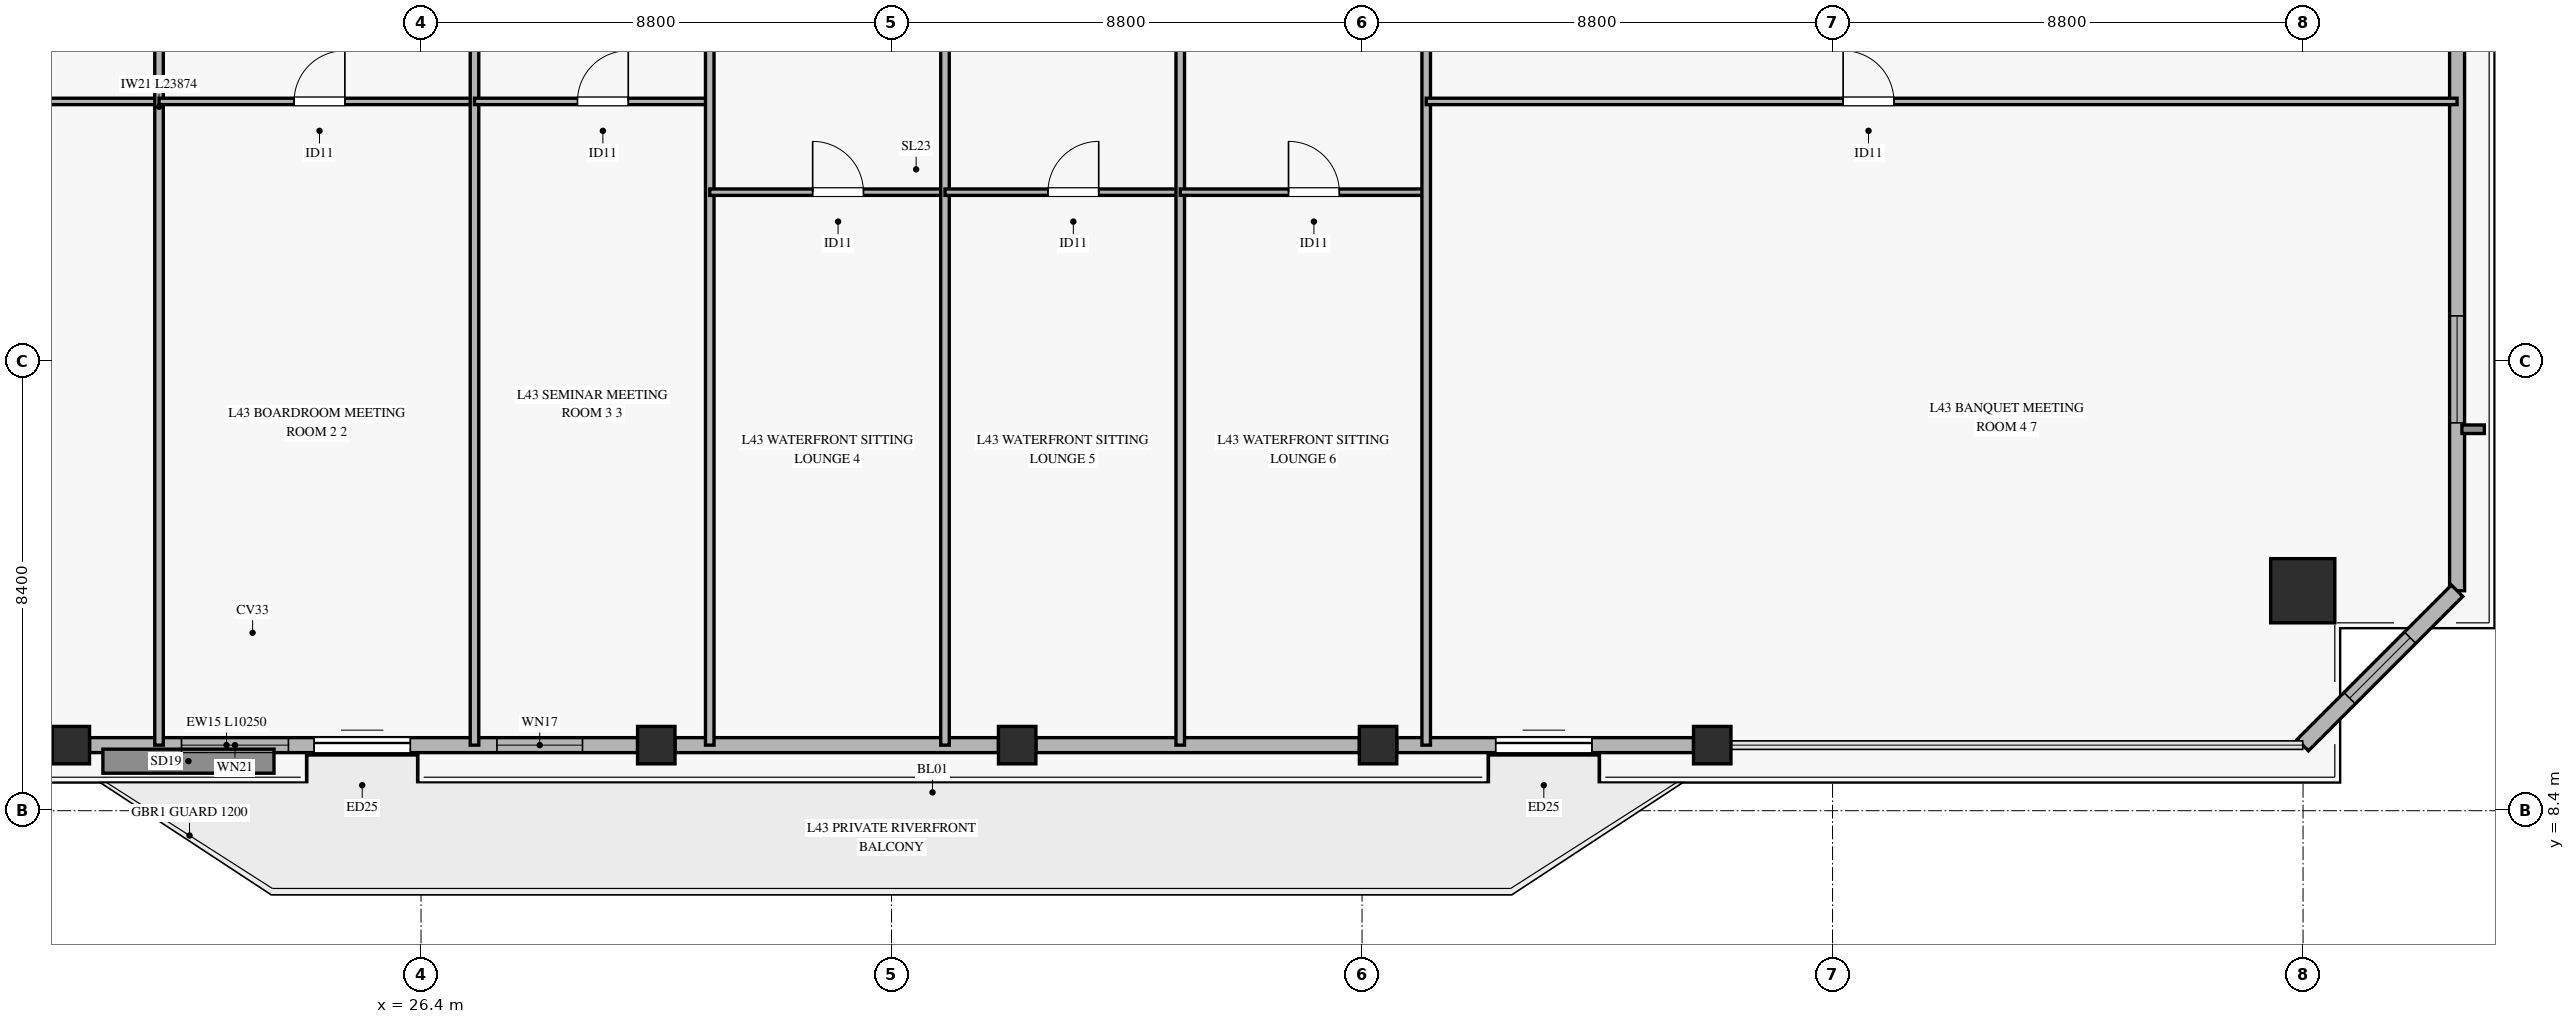
"""IFC4 building model, lengths in metres.
Left out: names, types, materials, properties, quantities, classifications, styles, units other than length and angle.
Written with IfcOpenShell. Run it as: python <this file> out.ifc"""

import sys

from ifc_helpers import new_model, si_unit, direction, frame, frame_2d, origin, origin_2d, place, context, subcontext, project, spatial, rectangle, hollow_rectangle, extrude, source, transform, mapped, element, fill, save


model = new_model("IFC4")
c1 = context("Model", 3, precision=1e-05, world=origin(), true_north=direction((0.0, 1.0)))
c2 = subcontext(c1, "Body", "Model", "MODEL_VIEW")
j1 = project(units=[si_unit("LENGTHUNIT", "METRE"), si_unit("PLANEANGLEUNIT", "RADIAN")], contexts=[c1])
p1 = place(None, origin())
s1 = spatial("IfcSite", under=j1, at=p1, CompositionType="ELEMENT")
p2 = place(p1, origin())
s2 = spatial("IfcBuilding", under=s1, at=p2, CompositionType="ELEMENT")
p3 = place(p2, frame((0.0, 0.0, 173.7)))
s3 = spatial("IfcBuildingStorey", under=s2, at=p3, CompositionType="ELEMENT", Elevation=173.7)
m1 = source(origin(), c2, "Body", "SweptSolid", [
    extrude(hollow_rectangle(XDim=1.2, YDim=1.2, WallThickness=0.055, at=origin_2d()), origin(), (0.0, 0.0, 1.0), 3.27),
])
p4 = place(p3, frame((61.594, 12.513, 0.0), z_axis=(0.0, 0.0, 1.0), x_axis=(1.0, 0.0, 0.0)))
e1 = element("IfcColumn", 1, at=p4, inside=s3, PredefinedType="COLUMN", context=c2, shape_type="MappedRepresentation", body=[
    mapped(m1, transform((0.0, 0.0, 0.0), x_axis=(1.0, 0.0, 0.0), y_axis=(0.0, 1.0, 0.0), z_axis=(0.0, 0.0, 1.0), scale=1.0)),
])
m2 = source(origin(), c2, "Body", "SweptSolid", [
    extrude(hollow_rectangle(XDim=0.7, YDim=0.7, WallThickness=0.032, at=origin_2d()), origin(), (0.0, 0.0, 1.0), 3.27),
])
for number, where, z_axis, x_axis in (
    (2, (19.85, 9.626, 0.0), (0.0, 0.0, 1.0), (1.0, 0.0, 0.0)),
    (3, (30.8, 9.626, 0.0), (0.0, 0.0, 1.0), (1.0, 0.0, 0.0)),
    (4, (37.55, 9.626, 0.0), (0.0, 0.0, 1.0), (1.0, 0.0, 0.0)),
    (5, (44.3, 9.626, 0.0), (0.0, 0.0, 1.0), (1.0, 0.0, 0.0)),
    (6, (50.55, 9.626, 0.0), (0.0, 0.0, 1.0), (1.0, 0.0, 0.0)),
):
    element("IfcColumn", number, at=place(p3, frame(where, z_axis=z_axis, x_axis=x_axis)), inside=s3, PredefinedType="COLUMN", context=c2, shape_type="MappedRepresentation", body=[
        mapped(m2, transform((0.0, 0.0, 0.0), x_axis=(1.0, 0.0, 0.0), y_axis=(0.0, 1.0, 0.0), z_axis=(0.0, 0.0, 1.0), scale=1.0)),
    ])
p5 = place(p3, frame((20.2, 9.626, 0.0), z_axis=(0.0, 0.0, 1.0), x_axis=(1.0, 0.0, 0.0)))
e7 = element("IfcWall", 7, at=p5, inside=s3, PredefinedType="SOLIDWALL", context=c2, shape_type="SweptSolid", body=[
    extrude(rectangle(XDim=10.25, YDim=0.28, at=frame_2d((5.125, 0.0))), origin(), (0.0, 0.0, 1.0), 2.75),
])
p6 = place(p5, frame((4.2, 0.0, 0.0)))
e8 = element("IfcOpeningElement", 8, at=p6, cuts=e7, PredefinedType="OPENING", context=c2, shape_type="SweptSolid", body=[
    extrude(rectangle(XDim=1.8, YDim=2.25, at=frame_2d((0.9, 1.125))), frame((0.0, 0.15, 0.0), z_axis=(0.0, -1.0, 0.0), x_axis=(1.0, 0.0, 0.0)), (0.0, 0.0, 1.0), 0.3),
])
p7 = place(p5, frame((1.72, 0.0, 0.45)))
e9 = element("IfcOpeningElement", 9, at=p7, cuts=e7, PredefinedType="OPENING", context=c2, shape_type="SweptSolid", body=[
    extrude(rectangle(XDim=2.0, YDim=2.0, at=frame_2d((1.0, 1.0))), frame((0.0, 0.15, 0.0), z_axis=(0.0, -1.0, 0.0), x_axis=(1.0, 0.0, 0.0)), (0.0, 0.0, 1.0), 0.3),
])
p8 = place(p5, frame((7.62, 0.0, 0.45)))
e10 = element("IfcOpeningElement", 10, at=p8, cuts=e7, PredefinedType="OPENING", context=c2, shape_type="SweptSolid", body=[
    extrude(rectangle(XDim=1.6, YDim=2.0, at=frame_2d((0.8, 1.0))), frame((0.0, 0.15, 0.0), z_axis=(0.0, -1.0, 0.0), x_axis=(1.0, 0.0, 0.0)), (0.0, 0.0, 1.0), 0.3),
])
for number, where, z_axis, x_axis in (
    (11, (31.15, 9.626, 0.0), (0.0, 0.0, 1.0), (1.0, 0.0, 0.0)),
    (12, (37.9, 9.626, 0.0), (0.0, 0.0, 1.0), (1.0, 0.0, 0.0)),
):
    element("IfcWall", number, at=place(p3, frame(where, z_axis=z_axis, x_axis=x_axis)), inside=s3, PredefinedType="SOLIDWALL", context=c2, shape_type="SweptSolid", body=[
        extrude(rectangle(XDim=6.05, YDim=0.28, at=frame_2d((3.025, 0.0))), origin(), (0.0, 0.0, 1.0), 2.75),
    ])
p9 = place(p3, frame((44.65, 9.626, 0.0), z_axis=(0.0, 0.0, 1.0), x_axis=(1.0, 0.0, 0.0)))
e13 = element("IfcWall", 13, at=p9, inside=s3, PredefinedType="SOLIDWALL", context=c2, shape_type="SweptSolid", body=[
    extrude(rectangle(XDim=5.55, YDim=0.28, at=frame_2d((2.775, 0.0))), origin(), (0.0, 0.0, 1.0), 2.75),
])
p10 = place(p9, frame((1.85, 0.0, 0.0)))
e14 = element("IfcOpeningElement", 14, at=p10, cuts=e13, PredefinedType="OPENING", context=c2, shape_type="SweptSolid", body=[
    extrude(rectangle(XDim=1.8, YDim=2.25, at=frame_2d((0.9, 1.125))), frame((0.0, 0.15, 0.0), z_axis=(0.0, -1.0, 0.0), x_axis=(1.0, 0.0, 0.0)), (0.0, 0.0, 1.0), 0.3),
])
p11 = place(p3, frame((64.481, 12.513, 0.0), z_axis=(0.0, 0.0, 1.0), x_axis=(0.0, 1.0, 0.0)))
e15 = element("IfcWall", 15, at=p11, inside=s3, PredefinedType="SOLIDWALL", context=c2, shape_type="SweptSolid", body=[
    extrude(rectangle(XDim=15.0, YDim=0.28, at=frame_2d((7.5, 0.0))), origin(), (0.0, 0.0, 1.0), 2.75),
])
p12 = place(p11, frame((3.14, 0.0, 0.45)))
e16 = element("IfcOpeningElement", 16, at=p12, cuts=e15, PredefinedType="OPENING", context=c2, shape_type="SweptSolid", body=[
    extrude(rectangle(XDim=2.0, YDim=2.0, at=frame_2d((1.0, 1.0))), frame((0.0, 0.15, 0.0), z_axis=(0.0, -1.0, 0.0), x_axis=(1.0, 0.0, 0.0)), (0.0, 0.0, 1.0), 0.3),
])
p13 = place(p11, frame((10.14, 0.0, 0.45)))
e17 = element("IfcOpeningElement", 17, at=p13, cuts=e15, PredefinedType="OPENING", context=c2, shape_type="SweptSolid", body=[
    extrude(rectangle(XDim=2.0, YDim=2.0, at=frame_2d((1.0, 1.0))), frame((0.0, 0.15, 0.0), z_axis=(0.0, -1.0, 0.0), x_axis=(1.0, 0.0, 0.0)), (0.0, 0.0, 1.0), 0.3),
])
p14 = place(p3, frame((61.594, 9.626, 0.0), z_axis=(0.0, 0.0, 1.0), x_axis=(0.707106781187, 0.707106781187, 0.0)))
e18 = element("IfcWall", 18, at=p14, inside=s3, PredefinedType="SOLIDWALL", context=c2, shape_type="SweptSolid", body=[
    extrude(rectangle(XDim=4.083, YDim=0.3, at=frame_2d((2.042, 0.0))), origin(), (0.0, 0.0, 1.0), 2.75),
])
p15 = place(p14, frame((1.241, 0.0, 0.45)))
e19 = element("IfcOpeningElement", 19, at=p15, cuts=e18, PredefinedType="OPENING", context=c2, shape_type="SweptSolid", body=[
    extrude(rectangle(XDim=1.6, YDim=2.0, at=frame_2d((0.8, 1.0))), frame((0.0, 0.16, 0.0), z_axis=(0.0, -1.0, 0.0), x_axis=(1.0, 0.0, 0.0)), (0.0, 0.0, 1.0), 0.32),
])
p16 = place(p3, frame((5.919, 21.663, 0.0), z_axis=(0.0, 0.0, 1.0), x_axis=(1.0, 0.0, 0.0)))
e20 = element("IfcWall", 20, at=p16, inside=s3, PredefinedType="PARTITIONING", context=c2, shape_type="SweptSolid", body=[
    extrude(rectangle(XDim=15.581, YDim=0.12, at=frame_2d((7.791, 0.0))), origin(), (0.0, 0.0, 1.0), 2.455),
])
p17 = place(p16, frame((6.518, 0.0, 0.0)))
e21 = element("IfcOpeningElement", 21, at=p17, cuts=e20, PredefinedType="OPENING", context=c2, shape_type="SweptSolid", body=[
    extrude(rectangle(XDim=0.95, YDim=2.1, at=frame_2d((0.475, 1.05))), frame((0.0, 0.07, 0.0), z_axis=(0.0, -1.0, 0.0), x_axis=(1.0, 0.0, 0.0)), (0.0, 0.0, 1.0), 0.14),
])
p18 = place(p3, frame((21.5, 9.626, 0.0), z_axis=(0.0, 0.0, 1.0), x_axis=(0.0, 1.0, 0.0)))
e22 = element("IfcWall", 22, at=p18, inside=s3, PredefinedType="PARTITIONING", context=c2, shape_type="SweptSolid", body=[
    extrude(rectangle(XDim=23.874, YDim=0.16, at=frame_2d((11.937, 0.0))), origin(), (0.0, 0.0, 1.0), 2.755),
])
p19 = place(p3, frame((21.5, 21.663, 0.0), z_axis=(0.0, 0.0, 1.0), x_axis=(1.0, 0.0, 0.0)))
e23 = element("IfcWall", 23, at=p19, inside=s3, PredefinedType="PARTITIONING", context=c2, shape_type="SweptSolid", body=[
    extrude(rectangle(XDim=5.9, YDim=0.12, at=frame_2d((2.95, 0.0))), origin(), (0.0, 0.0, 1.0), 3.27),
])
p20 = place(p19, frame((2.526, 0.0, 0.0)))
e24 = element("IfcOpeningElement", 24, at=p20, cuts=e23, PredefinedType="OPENING", context=c2, shape_type="SweptSolid", body=[
    extrude(rectangle(XDim=0.95, YDim=2.1, at=frame_2d((0.475, 1.05))), frame((0.0, 0.07, 0.0), z_axis=(0.0, -1.0, 0.0), x_axis=(1.0, 0.0, 0.0)), (0.0, 0.0, 1.0), 0.14),
])
p21 = place(p3, frame((27.4, 9.626, 0.0), z_axis=(0.0, 0.0, 1.0), x_axis=(0.0, 1.0, 0.0)))
e25 = element("IfcWall", 25, at=p21, inside=s3, PredefinedType="PARTITIONING", context=c2, shape_type="SweptSolid", body=[
    extrude(rectangle(XDim=23.874, YDim=0.16, at=frame_2d((11.937, 0.0))), origin(), (0.0, 0.0, 1.0), 2.755),
])
p22 = place(p3, frame((27.4, 21.663, 0.0), z_axis=(0.0, 0.0, 1.0), x_axis=(1.0, 0.0, 0.0)))
e26 = element("IfcWall", 26, at=p22, inside=s3, PredefinedType="PARTITIONING", context=c2, shape_type="SweptSolid", body=[
    extrude(rectangle(XDim=4.4, YDim=0.12, at=frame_2d((2.2, 0.0))), origin(), (0.0, 0.0, 1.0), 2.455),
])
p23 = place(p22, frame((1.926, 0.0, 0.0)))
e27 = element("IfcOpeningElement", 27, at=p23, cuts=e26, PredefinedType="OPENING", context=c2, shape_type="SweptSolid", body=[
    extrude(rectangle(XDim=0.95, YDim=2.1, at=frame_2d((0.475, 1.05))), frame((0.0, 0.07, 0.0), z_axis=(0.0, -1.0, 0.0), x_axis=(1.0, 0.0, 0.0)), (0.0, 0.0, 1.0), 0.14),
])
p24 = place(p3, frame((31.8, 9.626, 0.0), z_axis=(0.0, 0.0, 1.0), x_axis=(0.0, 1.0, 0.0)))
e28 = element("IfcWall", 28, at=p24, inside=s3, PredefinedType="PARTITIONING", context=c2, shape_type="SweptSolid", body=[
    extrude(rectangle(XDim=23.874, YDim=0.16, at=frame_2d((11.937, 0.0))), origin(), (0.0, 0.0, 1.0), 2.755),
])
p25 = place(p3, frame((31.8, 19.966, 0.0), z_axis=(0.0, 0.0, 1.0), x_axis=(1.0, 0.0, 0.0)))
e29 = element("IfcWall", 29, at=p25, inside=s3, PredefinedType="PARTITIONING", context=c2, shape_type="SweptSolid", body=[
    extrude(rectangle(XDim=4.4, YDim=0.12, at=frame_2d((2.2, 0.0))), origin(), (0.0, 0.0, 1.0), 3.27),
])
p26 = place(p25, frame((1.925, 0.0, 0.0)))
e30 = element("IfcOpeningElement", 30, at=p26, cuts=e29, PredefinedType="OPENING", context=c2, shape_type="SweptSolid", body=[
    extrude(rectangle(XDim=0.95, YDim=2.1, at=frame_2d((0.475, 1.05))), frame((0.0, 0.07, 0.0), z_axis=(0.0, -1.0, 0.0), x_axis=(1.0, 0.0, 0.0)), (0.0, 0.0, 1.0), 0.14),
])
p27 = place(p3, frame((36.2, 9.626, 0.0), z_axis=(0.0, 0.0, 1.0), x_axis=(0.0, 1.0, 0.0)))
e31 = element("IfcWall", 31, at=p27, inside=s3, PredefinedType="PARTITIONING", context=c2, shape_type="SweptSolid", body=[
    extrude(rectangle(XDim=23.874, YDim=0.16, at=frame_2d((11.937, 0.0))), origin(), (0.0, 0.0, 1.0), 2.755),
])
p28 = place(p3, frame((36.2, 19.966, 0.0), z_axis=(0.0, 0.0, 1.0), x_axis=(1.0, 0.0, 0.0)))
e32 = element("IfcWall", 32, at=p28, inside=s3, PredefinedType="PARTITIONING", context=c2, shape_type="SweptSolid", body=[
    extrude(rectangle(XDim=4.4, YDim=0.12, at=frame_2d((2.2, 0.0))), origin(), (0.0, 0.0, 1.0), 2.455),
])
p29 = place(p28, frame((1.925, 0.0, 0.0)))
e33 = element("IfcOpeningElement", 33, at=p29, cuts=e32, PredefinedType="OPENING", context=c2, shape_type="SweptSolid", body=[
    extrude(rectangle(XDim=0.95, YDim=2.1, at=frame_2d((0.475, 1.05))), frame((0.0, 0.07, 0.0), z_axis=(0.0, -1.0, 0.0), x_axis=(1.0, 0.0, 0.0)), (0.0, 0.0, 1.0), 0.14),
])
p30 = place(p3, frame((40.6, 9.626, 0.0), z_axis=(0.0, 0.0, 1.0), x_axis=(0.0, 1.0, 0.0)))
e34 = element("IfcWall", 34, at=p30, inside=s3, PredefinedType="PARTITIONING", context=c2, shape_type="SweptSolid", body=[
    extrude(rectangle(XDim=23.874, YDim=0.16, at=frame_2d((11.937, 0.0))), origin(), (0.0, 0.0, 1.0), 2.755),
])
p31 = place(p3, frame((40.6, 19.966, 0.0), z_axis=(0.0, 0.0, 1.0), x_axis=(1.0, 0.0, 0.0)))
e35 = element("IfcWall", 35, at=p31, inside=s3, PredefinedType="PARTITIONING", context=c2, shape_type="SweptSolid", body=[
    extrude(rectangle(XDim=4.6, YDim=0.12, at=frame_2d((2.3, 0.0))), origin(), (0.0, 0.0, 1.0), 2.455),
])
p32 = place(p31, frame((2.025, 0.0, 0.0)))
e36 = element("IfcOpeningElement", 36, at=p32, cuts=e35, PredefinedType="OPENING", context=c2, shape_type="SweptSolid", body=[
    extrude(rectangle(XDim=0.95, YDim=2.1, at=frame_2d((0.475, 1.05))), frame((0.0, 0.07, 0.0), z_axis=(0.0, -1.0, 0.0), x_axis=(1.0, 0.0, 0.0)), (0.0, 0.0, 1.0), 0.14),
])
p33 = place(p3, frame((45.2, 9.626, 0.0), z_axis=(0.0, 0.0, 1.0), x_axis=(0.0, 1.0, 0.0)))
e37 = element("IfcWall", 37, at=p33, inside=s3, PredefinedType="PARTITIONING", context=c2, shape_type="SweptSolid", body=[
    extrude(rectangle(XDim=23.874, YDim=0.16, at=frame_2d((11.937, 0.0))), origin(), (0.0, 0.0, 1.0), 2.755),
])
p34 = place(p3, frame((45.2, 21.663, 0.0), z_axis=(0.0, 0.0, 1.0), x_axis=(1.0, 0.0, 0.0)))
e38 = element("IfcWall", 38, at=p34, inside=s3, PredefinedType="PARTITIONING", context=c2, shape_type="SweptSolid", body=[
    extrude(rectangle(XDim=19.281, YDim=0.12, at=frame_2d((9.641, 0.0))), origin(), (0.0, 0.0, 1.0), 2.455),
])
p35 = place(p34, frame((7.798, 0.0, 0.0)))
e39 = element("IfcOpeningElement", 39, at=p35, cuts=e38, PredefinedType="OPENING", context=c2, shape_type="SweptSolid", body=[
    extrude(rectangle(XDim=0.95, YDim=2.1, at=frame_2d((0.475, 1.05))), frame((0.0, 0.07, 0.0), z_axis=(0.0, -1.0, 0.0), x_axis=(1.0, 0.0, 0.0)), (0.0, 0.0, 1.0), 0.14),
])
m3 = source(origin(), c2, "Body", "SweptSolid", [
    extrude(rectangle(XDim=1.8, YDim=2.25, at=frame_2d((0.9, 1.125))), frame((0.0, 0.025, 0.0), z_axis=(0.0, -1.0, 0.0), x_axis=(1.0, 0.0, 0.0)), (0.0, 0.0, 1.0), 0.05),
])
p36 = place(p6, origin())
e40 = element("IfcDoor", 40, at=p36, inside=s3, OperationType="SLIDING_TO_LEFT", PredefinedType="DOOR", context=c2, shape_type="MappedRepresentation", body=[
    mapped(m3, transform((0.0, 0.0, 0.0), x_axis=(1.0, 0.0, 0.0), y_axis=(0.0, 1.0, 0.0), z_axis=(0.0, 0.0, 1.0), scale=1.0)),
])
fill(e8, e40)
m4 = source(origin(), c2, "Body", "SweptSolid", [
    extrude(rectangle(XDim=2.0, YDim=2.0, at=frame_2d((1.0, 1.0))), frame((0.0, 0.03, 0.0), z_axis=(0.0, -1.0, 0.0), x_axis=(1.0, 0.0, 0.0)), (0.0, 0.0, 1.0), 0.06),
])
p37 = place(p7, origin())
e41 = element("IfcWindow", 41, at=p37, inside=s3, PartitioningType="SINGLE_PANEL", PredefinedType="WINDOW", context=c2, shape_type="MappedRepresentation", body=[
    mapped(m4, transform((0.0, 0.0, 0.0), x_axis=(1.0, 0.0, 0.0), y_axis=(0.0, 1.0, 0.0), z_axis=(0.0, 0.0, 1.0), scale=1.0)),
])
fill(e9, e41)
m5 = source(origin(), c2, "Body", "SweptSolid", [
    extrude(rectangle(XDim=1.6, YDim=2.0, at=frame_2d((0.8, 1.0))), frame((0.0, 0.03, 0.0), z_axis=(0.0, -1.0, 0.0), x_axis=(1.0, 0.0, 0.0)), (0.0, 0.0, 1.0), 0.06),
])
p38 = place(p8, origin())
e42 = element("IfcWindow", 42, at=p38, inside=s3, PartitioningType="SINGLE_PANEL", PredefinedType="WINDOW", context=c2, shape_type="MappedRepresentation", body=[
    mapped(m5, transform((0.0, 0.0, 0.0), x_axis=(1.0, 0.0, 0.0), y_axis=(0.0, 1.0, 0.0), z_axis=(0.0, 0.0, 1.0), scale=1.0)),
])
fill(e10, e42)
p39 = place(p10, origin())
e43 = element("IfcDoor", 43, at=p39, inside=s3, OperationType="SLIDING_TO_LEFT", PredefinedType="DOOR", context=c2, shape_type="MappedRepresentation", body=[
    mapped(m3, transform((0.0, 0.0, 0.0), x_axis=(1.0, 0.0, 0.0), y_axis=(0.0, 1.0, 0.0), z_axis=(0.0, 0.0, 1.0), scale=1.0)),
])
fill(e14, e43)
p40 = place(p12, origin())
e44 = element("IfcWindow", 44, at=p40, inside=s3, PartitioningType="SINGLE_PANEL", PredefinedType="WINDOW", context=c2, shape_type="MappedRepresentation", body=[
    mapped(m4, transform((0.0, 0.0, 0.0), x_axis=(1.0, 0.0, 0.0), y_axis=(0.0, 1.0, 0.0), z_axis=(0.0, 0.0, 1.0), scale=1.0)),
])
fill(e16, e44)
p41 = place(p15, origin())
e45 = element("IfcWindow", 45, at=p41, inside=s3, PartitioningType="SINGLE_PANEL", PredefinedType="WINDOW", context=c2, shape_type="MappedRepresentation", body=[
    mapped(m5, transform((0.0, 0.0, 0.0), x_axis=(1.0, 0.0, 0.0), y_axis=(0.0, 1.0, 0.0), z_axis=(0.0, 0.0, 1.0), scale=1.0)),
])
fill(e19, e45)
m6 = source(origin(), c2, "Body", "SweptSolid", [
    extrude(rectangle(XDim=0.95, YDim=2.1, at=frame_2d((0.475, 1.05))), frame((0.0, 0.025, 0.0), z_axis=(0.0, -1.0, 0.0), x_axis=(1.0, 0.0, 0.0)), (0.0, 0.0, 1.0), 0.05),
])
p42 = place(p20, origin())
e46 = element("IfcDoor", 46, at=p42, inside=s3, OperationType="SINGLE_SWING_RIGHT", PredefinedType="DOOR", context=c2, shape_type="MappedRepresentation", body=[
    mapped(m6, transform((0.0, 0.0, 0.0), x_axis=(1.0, 0.0, 0.0), y_axis=(0.0, 1.0, 0.0), z_axis=(0.0, 0.0, 1.0), scale=1.0)),
])
fill(e24, e46)
p43 = place(p23, origin())
e47 = element("IfcDoor", 47, at=p43, inside=s3, OperationType="SINGLE_SWING_RIGHT", PredefinedType="DOOR", context=c2, shape_type="MappedRepresentation", body=[
    mapped(m6, transform((0.0, 0.0, 0.0), x_axis=(1.0, 0.0, 0.0), y_axis=(0.0, 1.0, 0.0), z_axis=(0.0, 0.0, 1.0), scale=1.0)),
])
fill(e27, e47)
p44 = place(p26, origin())
e48 = element("IfcDoor", 48, at=p44, inside=s3, OperationType="SINGLE_SWING_LEFT", PredefinedType="DOOR", context=c2, shape_type="MappedRepresentation", body=[
    mapped(m6, transform((0.0, 0.0, 0.0), x_axis=(1.0, 0.0, 0.0), y_axis=(0.0, 1.0, 0.0), z_axis=(0.0, 0.0, 1.0), scale=1.0)),
])
fill(e30, e48)
p45 = place(p29, origin())
e49 = element("IfcDoor", 49, at=p45, inside=s3, OperationType="SINGLE_SWING_RIGHT", PredefinedType="DOOR", context=c2, shape_type="MappedRepresentation", body=[
    mapped(m6, transform((0.0, 0.0, 0.0), x_axis=(1.0, 0.0, 0.0), y_axis=(0.0, 1.0, 0.0), z_axis=(0.0, 0.0, 1.0), scale=1.0)),
])
fill(e33, e49)
p46 = place(p32, origin())
e50 = element("IfcDoor", 50, at=p46, inside=s3, OperationType="SINGLE_SWING_LEFT", PredefinedType="DOOR", context=c2, shape_type="MappedRepresentation", body=[
    mapped(m6, transform((0.0, 0.0, 0.0), x_axis=(1.0, 0.0, 0.0), y_axis=(0.0, 1.0, 0.0), z_axis=(0.0, 0.0, 1.0), scale=1.0)),
])
fill(e36, e50)
p47 = place(p35, origin())
e51 = element("IfcDoor", 51, at=p47, inside=s3, OperationType="SINGLE_SWING_LEFT", PredefinedType="DOOR", context=c2, shape_type="MappedRepresentation", body=[
    mapped(m6, transform((0.0, 0.0, 0.0), x_axis=(1.0, 0.0, 0.0), y_axis=(0.0, 1.0, 0.0), z_axis=(0.0, 0.0, 1.0), scale=1.0)),
])
fill(e39, e51)
save(model, sys.argv[1])
